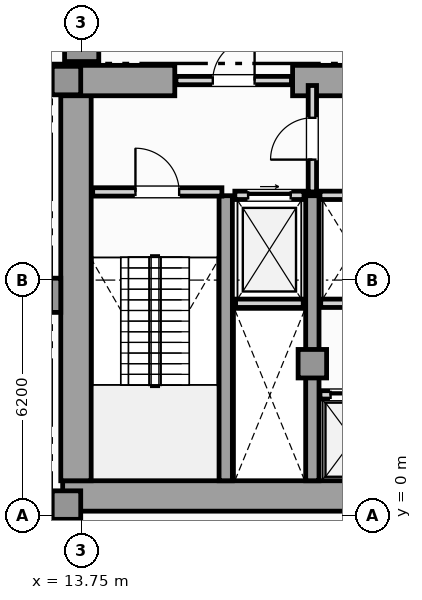
"""IFC4 building model, lengths in metres.
Left out: names, types, materials, properties, quantities, classifications, styles, units other than length and angle.
Written with IfcOpenShell. Run it as: python <this file> out.ifc"""

import sys

from ifc_helpers import new_model, si_unit, direction, frame, frame_2d, origin, origin_2d, place, context, subcontext, project, spatial, rectangle, extrude, element, fill, save


model = new_model("IFC4")
c1 = context("Model", 3, precision=1e-05, world=origin(), true_north=direction((0.0, 1.0)))
c2 = subcontext(c1, "Body", "Model", "MODEL_VIEW")
j1 = project(units=[si_unit("LENGTHUNIT", "METRE"), si_unit("PLANEANGLEUNIT", "RADIAN")], contexts=[c1])
p1 = place(None, origin())
s1 = spatial("IfcSite", under=j1, at=p1, CompositionType="ELEMENT")
p2 = place(p1, origin())
s2 = spatial("IfcBuilding", under=s1, at=p2, CompositionType="ELEMENT")
p3 = place(p2, frame((0.0, 0.0, 19.8)))
s3 = spatial("IfcBuildingStorey", under=s2, at=p3, CompositionType="ELEMENT", Elevation=19.8)
p4 = place(p3, frame((13.25, 0.52, 0.0), z_axis=(0.0, 0.0, 1.0), x_axis=(1.0, 0.0, 0.0)))
e1 = element("IfcWall", 1, at=p4, inside=s3, PredefinedType="SHEAR", context=c2, shape_type="SweptSolid", body=[
    extrude(rectangle(XDim=31.0, YDim=0.8, at=frame_2d((15.5, 0.0))), origin(), (0.0, 0.0, 1.0), 4.4),
])
p5 = place(p3, frame((13.6, 0.92, 0.0), z_axis=(0.0, 0.0, 1.0), x_axis=(0.0, 1.0, 0.0)))
e2 = element("IfcWall", 2, at=p5, inside=s3, PredefinedType="SHEAR", context=c2, shape_type="SweptSolid", body=[
    extrude(rectangle(XDim=10.53, YDim=0.8, at=frame_2d((5.265, 0.0))), origin(), (0.0, 0.0, 1.0), 4.4),
])
p6 = place(p3, frame((13.25, 11.45, 0.0), z_axis=(0.0, 0.0, 1.0), x_axis=(1.0, 0.0, 0.0)))
e3 = element("IfcWall", 3, at=p6, inside=s3, PredefinedType="SHEAR", context=c2, shape_type="SweptSolid", body=[
    extrude(rectangle(XDim=2.95, YDim=0.8, at=frame_2d((1.475, 0.0))), origin(), (0.0, 0.0, 1.0), 4.4),
])
p7 = place(p3, frame((19.3, 11.45, 0.0), z_axis=(0.0, 0.0, 1.0), x_axis=(1.0, 0.0, 0.0)))
e4 = element("IfcWall", 4, at=p7, inside=s3, PredefinedType="SHEAR", context=c2, shape_type="SweptSolid", body=[
    extrude(rectangle(XDim=7.3, YDim=0.8, at=frame_2d((3.65, 0.0))), origin(), (0.0, 0.0, 1.0), 4.4),
])
for number, where, z_axis, x_axis in (
    (5, (17.54, 0.92, 0.0), (0.0, 0.0, 1.0), (0.0, 1.0, 0.0)),
    (6, (19.82, 0.92, 0.0), (0.0, 0.0, 1.0), (0.0, 1.0, 0.0)),
):
    element("IfcWall", number, at=place(p3, frame(where, z_axis=z_axis, x_axis=x_axis)), inside=s3, PredefinedType="SHEAR", context=c2, shape_type="SweptSolid", body=[
        extrude(rectangle(XDim=7.5, YDim=0.35, at=frame_2d((3.75, 0.0))), origin(), (0.0, 0.0, 1.0), 4.4),
    ])
p8 = place(p3, frame((12.9, 5.8, 0.0), z_axis=(0.0, 0.0, 1.0), x_axis=(1.0, 0.0, 0.0)))
e7 = element("IfcColumn", 7, at=p8, inside=s3, PredefinedType="PILASTER", context=c2, shape_type="SweptSolid", body=[
    extrude(rectangle(XDim=0.6, YDim=0.9, at=origin_2d()), origin(), (0.0, 0.0, 1.0), 4.8),
])
for number, where, z_axis, x_axis in (
    (8, (13.35, 0.28, 0.0), (0.0, 0.0, 1.0), (1.0, 0.0, 0.0)),
    (9, (13.35, 11.45, 0.0), (0.0, 0.0, 1.0), (1.0, 0.0, 0.0)),
    (10, (19.82, 4.0, 0.0), (0.0, 0.0, 1.0), (1.0, 0.0, 0.0)),
):
    element("IfcColumn", number, at=place(p3, frame(where, z_axis=z_axis, x_axis=x_axis)), inside=s3, PredefinedType="COLUMN", context=c2, shape_type="SweptSolid", body=[
        extrude(rectangle(XDim=0.75, YDim=0.75, at=origin_2d()), origin(), (0.0, 0.0, 1.0), 4.8),
    ])
p9 = place(p3, frame((13.75, 12.4, 0.0), z_axis=(0.0, 0.0, 1.0), x_axis=(1.0, 0.0, 0.0)))
e11 = element("IfcColumn", 11, at=p9, inside=s3, PredefinedType="COLUMN", context=c2, shape_type="SweptSolid", body=[
    extrude(rectangle(XDim=0.9, YDim=0.9, at=origin_2d()), origin(), (0.0, 0.0, 1.0), 4.8),
])
p10 = place(p3, frame((17.8, 5.59, 0.0), z_axis=(0.0, 0.0, 1.0), x_axis=(1.0, 0.0, 0.0)))
e12 = element("IfcWall", 12, at=p10, inside=s3, PredefinedType="SOLIDWALL", context=c2, shape_type="SweptSolid", body=[
    extrude(rectangle(XDim=1.78, YDim=0.22, at=frame_2d((0.89, 0.0))), origin(), (0.0, 0.0, 1.0), 4.4),
])
p11 = place(p3, frame((17.78, 8.43, 0.0), z_axis=(0.0, 0.0, 1.0), x_axis=(1.0, 0.0, 0.0)))
e13 = element("IfcWall", 13, at=p11, inside=s3, PredefinedType="SOLIDWALL", context=c2, shape_type="SweptSolid", body=[
    extrude(rectangle(XDim=1.82, YDim=0.22, at=frame_2d((0.91, 0.0))), origin(), (0.0, 0.0, 1.0), 4.4),
])
p12 = place(p11, frame((0.35, 0.0, 0.0)))
e14 = element("IfcOpeningElement", 14, at=p12, cuts=e13, PredefinedType="OPENING", context=c2, shape_type="SweptSolid", body=[
    extrude(rectangle(XDim=1.12, YDim=2.25, at=frame_2d((0.56, 1.125))), frame((0.0, 0.12, 0.0), z_axis=(0.0, -1.0, 0.0), x_axis=(1.0, 0.0, 0.0)), (0.0, 0.0, 1.0), 0.24),
])
p13 = place(p3, frame((20.02, 3.18, 0.0), z_axis=(0.0, 0.0, 1.0), x_axis=(1.0, 0.0, 0.0)))
e15 = element("IfcWall", 15, at=p13, inside=s3, PredefinedType="SOLIDWALL", context=c2, shape_type="SweptSolid", body=[
    extrude(rectangle(XDim=1.74, YDim=0.22, at=frame_2d((0.87, 0.0))), origin(), (0.0, 0.0, 1.0), 4.4),
])
p14 = place(p13, frame((0.28, 0.0, 0.0)))
e16 = element("IfcOpeningElement", 16, at=p14, cuts=e15, PredefinedType="OPENING", context=c2, shape_type="SweptSolid", body=[
    extrude(rectangle(XDim=1.18, YDim=2.2, at=frame_2d((0.59, 1.1))), frame((0.0, 0.12, 0.0), z_axis=(0.0, -1.0, 0.0), x_axis=(1.0, 0.0, 0.0)), (0.0, 0.0, 1.0), 0.24),
])
p15 = place(p3, frame((20.04, 5.59, 0.0), z_axis=(0.0, 0.0, 1.0), x_axis=(1.0, 0.0, 0.0)))
e17 = element("IfcWall", 17, at=p15, inside=s3, PredefinedType="SOLIDWALL", context=c2, shape_type="SweptSolid", body=[
    extrude(rectangle(XDim=1.7, YDim=0.22, at=frame_2d((0.85, 0.0))), origin(), (0.0, 0.0, 1.0), 4.4),
])
p16 = place(p3, frame((20.02, 8.43, 0.0), z_axis=(0.0, 0.0, 1.0), x_axis=(1.0, 0.0, 0.0)))
e18 = element("IfcWall", 18, at=p16, inside=s3, PredefinedType="SOLIDWALL", context=c2, shape_type="SweptSolid", body=[
    extrude(rectangle(XDim=1.74, YDim=0.22, at=frame_2d((0.87, 0.0))), origin(), (0.0, 0.0, 1.0), 4.4),
])
p17 = place(p3, frame((14.04, 8.52, 0.0), z_axis=(0.0, 0.0, 1.0), x_axis=(1.0, 0.0, 0.0)))
e19 = element("IfcWall", 19, at=p17, inside=s3, PredefinedType="SOLIDWALL", context=c2, shape_type="SweptSolid", body=[
    extrude(rectangle(XDim=3.4, YDim=0.22, at=frame_2d((1.7, 0.0))), origin(), (0.0, 0.0, 1.0), 4.4),
])
p18 = place(p17, frame((1.125, 0.0, 0.0)))
e20 = element("IfcOpeningElement", 20, at=p18, cuts=e19, PredefinedType="OPENING", context=c2, shape_type="SweptSolid", body=[
    extrude(rectangle(XDim=1.15, YDim=2.2, at=frame_2d((0.575, 1.1))), frame((0.0, 0.12, 0.0), z_axis=(0.0, -1.0, 0.0), x_axis=(1.0, 0.0, 0.0)), (0.0, 0.0, 1.0), 0.24),
])
p19 = place(p3, frame((19.82, 8.52, 0.0), z_axis=(0.0, 0.0, 1.0), x_axis=(0.0, 1.0, 0.0)))
e21 = element("IfcWall", 21, at=p19, inside=s3, PredefinedType="SOLIDWALL", context=c2, shape_type="SweptSolid", body=[
    extrude(rectangle(XDim=2.8, YDim=0.22, at=frame_2d((1.4, 0.0))), origin(), (0.0, 0.0, 1.0), 3.855),
])
p20 = place(p19, frame((0.85, 0.0, 0.0)))
e22 = element("IfcOpeningElement", 22, at=p20, cuts=e21, PredefinedType="OPENING", context=c2, shape_type="SweptSolid", body=[
    extrude(rectangle(XDim=1.1, YDim=2.2, at=frame_2d((0.55, 1.1))), frame((0.0, 0.12, 0.0), z_axis=(0.0, -1.0, 0.0), x_axis=(1.0, 0.0, 0.0)), (0.0, 0.0, 1.0), 0.24),
])
p21 = place(p3, frame((16.23, 11.45, 0.0), z_axis=(0.0, 0.0, 1.0), x_axis=(1.0, 0.0, 0.0)))
e23 = element("IfcWall", 23, at=p21, inside=s3, PredefinedType="SOLIDWALL", context=c2, shape_type="SweptSolid", body=[
    extrude(rectangle(XDim=3.04, YDim=0.22, at=frame_2d((1.52, 0.0))), origin(), (0.0, 0.0, 1.0), 4.4),
])
p22 = place(p21, frame((0.97, 0.0, 0.0)))
e24 = element("IfcOpeningElement", 24, at=p22, cuts=e23, PredefinedType="OPENING", context=c2, shape_type="SweptSolid", body=[
    extrude(rectangle(XDim=1.1, YDim=2.2, at=frame_2d((0.55, 1.1))), frame((0.0, 0.12, 0.0), z_axis=(0.0, -1.0, 0.0), x_axis=(1.0, 0.0, 0.0)), (0.0, 0.0, 1.0), 0.24),
])
p23 = place(p12, origin())
e25 = element("IfcDoor", 25, at=p23, inside=s3, OperationType="SLIDING_TO_RIGHT", PredefinedType="DOOR", context=c2, shape_type="SweptSolid", body=[
    extrude(rectangle(XDim=1.12, YDim=2.25, at=frame_2d((0.56, 1.125))), frame((0.0, 0.025, 0.0), z_axis=(0.0, -1.0, 0.0), x_axis=(1.0, 0.0, 0.0)), (0.0, 0.0, 1.0), 0.05),
])
fill(e14, e25)
p24 = place(p14, origin())
e26 = element("IfcDoor", 26, at=p24, inside=s3, OperationType="SLIDING_TO_LEFT", PredefinedType="DOOR", context=c2, shape_type="SweptSolid", body=[
    extrude(rectangle(XDim=1.18, YDim=2.2, at=frame_2d((0.59, 1.1))), frame((0.0, 0.025, 0.0), z_axis=(0.0, -1.0, 0.0), x_axis=(1.0, 0.0, 0.0)), (0.0, 0.0, 1.0), 0.05),
])
fill(e16, e26)
p25 = place(p18, origin())
e27 = element("IfcDoor", 27, at=p25, inside=s3, OperationType="SINGLE_SWING_LEFT", PredefinedType="DOOR", context=c2, shape_type="SweptSolid", body=[
    extrude(rectangle(XDim=1.15, YDim=2.2, at=frame_2d((0.575, 1.1))), frame((0.0, 0.025, 0.0), z_axis=(0.0, -1.0, 0.0), x_axis=(1.0, 0.0, 0.0)), (0.0, 0.0, 1.0), 0.05),
])
fill(e20, e27)
p26 = place(p20, origin())
e28 = element("IfcDoor", 28, at=p26, inside=s3, OperationType="SINGLE_SWING_LEFT", PredefinedType="DOOR", context=c2, shape_type="SweptSolid", body=[
    extrude(rectangle(XDim=1.1, YDim=2.2, at=frame_2d((0.55, 1.1))), frame((0.0, 0.025, 0.0), z_axis=(0.0, -1.0, 0.0), x_axis=(1.0, 0.0, 0.0)), (0.0, 0.0, 1.0), 0.05),
])
fill(e22, e28)
p27 = place(p22, origin())
e29 = element("IfcDoor", 29, at=p27, inside=s3, OperationType="SINGLE_SWING_RIGHT", PredefinedType="DOOR", context=c2, shape_type="SweptSolid", body=[
    extrude(rectangle(XDim=1.1, YDim=2.2, at=frame_2d((0.55, 1.1))), frame((0.0, 0.025, 0.0), z_axis=(0.0, -1.0, 0.0), x_axis=(1.0, 0.0, 0.0)), (0.0, 0.0, 1.0), 0.05),
])
fill(e24, e29)
save(model, sys.argv[1])
